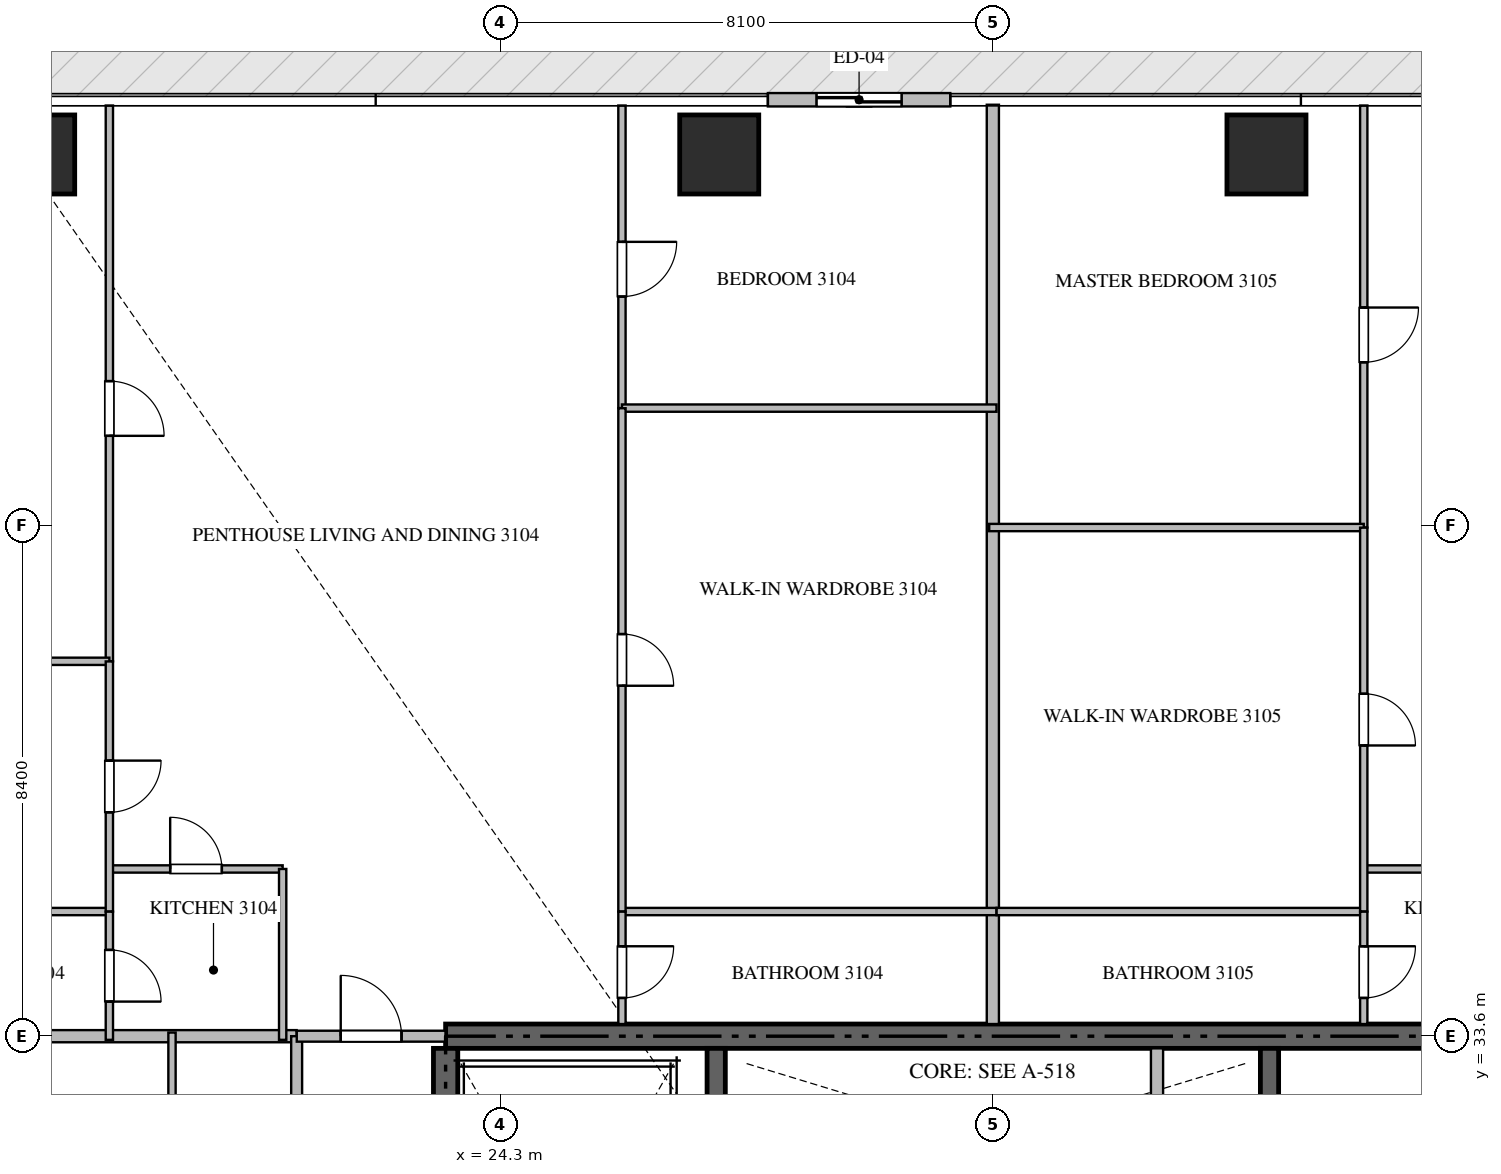
"""IFC4 building model, lengths in metres.
Left out: names, types, materials, properties, quantities, classifications, styles, units other than length and angle.
Written with IfcOpenShell. Run it as: python <this file> out.ifc"""

import sys

from ifc_helpers import new_model, si_unit, direction, frame, frame_2d, origin, origin_2d, place, context, subcontext, project, spatial, rectangle, extrude, source, transform, mapped, element, fill, save


model = new_model("IFC4")
c1 = context("Model", 3, precision=1e-05, world=origin(), true_north=direction((0.0, 1.0)))
c2 = subcontext(c1, "Body", "Model", "MODEL_VIEW")
j1 = project(units=[si_unit("LENGTHUNIT", "METRE"), si_unit("PLANEANGLEUNIT", "RADIAN")], contexts=[c1])
p1 = place(None, origin())
s1 = spatial("IfcSite", under=j1, at=p1, CompositionType="ELEMENT")
p2 = place(p1, origin())
s2 = spatial("IfcBuilding", under=s1, at=p2, CompositionType="ELEMENT")
p3 = place(p2, frame((0.0, 0.0, 127.65)))
s3 = spatial("IfcBuildingStorey", under=s2, at=p3, CompositionType="ELEMENT", Elevation=127.65)
p4 = place(p3, frame((41.4, 33.6, -0.26), z_axis=(0.0, 0.0, 1.0), x_axis=(-1.0, 0.0, 0.0)))
e1 = element("IfcWall", 1, at=p4, inside=s3, PredefinedType="SHEAR", context=c2, shape_type="SweptSolid", body=[
    extrude(rectangle(XDim=18.0, YDim=0.4, at=frame_2d((9.0, 0.0))), origin(), (0.0, 0.0, 1.0), 3.748),
])
p5 = place(p3, frame((23.4, 24.25, -0.26), z_axis=(0.0, 0.0, 1.0), x_axis=(0.0, 1.0, 0.0)))
e2 = element("IfcWall", 2, at=p5, inside=s3, PredefinedType="SHEAR", context=c2, shape_type="SweptSolid", body=[
    extrude(rectangle(XDim=9.15, YDim=0.4, at=frame_2d((4.575, 0.0))), origin(), (0.0, 0.0, 1.0), 3.748),
])
p6 = place(p3, frame((27.85, 23.55, -0.26), z_axis=(0.0, 0.0, 1.0), x_axis=(0.0, 1.0, 0.0)))
e3 = element("IfcWall", 3, at=p6, inside=s3, PredefinedType="SHEAR", context=c2, shape_type="SweptSolid", body=[
    extrude(rectangle(XDim=9.85, YDim=0.3, at=frame_2d((4.925, 0.0))), origin(), (0.0, 0.0, 1.0), 3.748),
])
p7 = place(p3, frame((36.95, 27.05, -0.26), z_axis=(0.0, 0.0, 1.0), x_axis=(0.0, 1.0, 0.0)))
e4 = element("IfcWall", 4, at=p7, inside=s3, PredefinedType="SHEAR", context=c2, shape_type="SweptSolid", body=[
    extrude(rectangle(XDim=6.35, YDim=0.3, at=frame_2d((3.175, 0.0))), origin(), (0.0, 0.0, 1.0), 3.748),
])
m1 = source(origin(), c2, "Body", "SweptSolid", [
    extrude(rectangle(XDim=1.3, YDim=1.3, at=origin_2d()), origin(), (0.0, 0.0, 1.0), 3.75),
])
for number, where, z_axis, x_axis in (
    (5, (16.65, 48.1, -0.26), (0.0, 0.0, 1.0), (1.0, 0.0, 0.0)),
    (6, (27.9, 48.1, -0.26), (0.0, 0.0, 1.0), (1.0, 0.0, 0.0)),
    (7, (36.9, 48.1, -0.26), (0.0, 0.0, 1.0), (1.0, 0.0, 0.0)),
):
    element("IfcColumn", number, at=place(p3, frame(where, z_axis=z_axis, x_axis=x_axis)), inside=s3, PredefinedType="COLUMN", context=c2, shape_type="MappedRepresentation", body=[
        mapped(m1, transform((0.0, 0.0, 0.0), scale=1.0)),
    ])
p8 = place(p3, frame((31.7, 49.0, 0.0), z_axis=(0.0, 0.0, 1.0), x_axis=(-1.0, 0.0, 0.0)))
e8 = element("IfcWall", 8, at=p8, inside=s3, PredefinedType="ELEMENTEDWALL", context=c2, shape_type="SweptSolid", body=[
    extrude(rectangle(XDim=3.0, YDim=0.22, at=frame_2d((1.5, 0.0))), origin(), (0.0, 0.0, 1.0), 3.475),
])
p9 = place(p8, frame((0.8, 0.0, 0.0)))
e9 = element("IfcOpeningElement", 9, at=p9, cuts=e8, PredefinedType="OPENING", context=c2, shape_type="SweptSolid", body=[
    extrude(rectangle(XDim=1.4, YDim=2.25, at=frame_2d((0.7, 1.125))), frame((0.0, 0.12, 0.0), z_axis=(0.0, -1.0, 0.0), x_axis=(1.0, 0.0, 0.0)), (0.0, 0.0, 1.0), 0.24),
])
p10 = place(p3, frame((35.1, 30.75, 0.0), z_axis=(0.0, 0.0, 1.0), x_axis=(0.0, 1.0, 0.0)))
e10 = element("IfcWall", 10, at=p10, inside=s3, PredefinedType="STANDARD", context=c2, shape_type="SweptSolid", body=[
    extrude(rectangle(XDim=2.65, YDim=0.2, at=frame_2d((1.325, 0.0))), origin(), (0.0, 0.0, 1.0), 3.49),
])
p11 = place(p3, frame((32.4, 33.8, 0.0), z_axis=(0.0, 0.0, 1.0), x_axis=(0.0, 1.0, 0.0)))
e11 = element("IfcWall", 11, at=p11, inside=s3, PredefinedType="PARTITIONING", context=c2, shape_type="SweptSolid", body=[
    extrude(rectangle(XDim=15.118, YDim=0.2, at=frame_2d((7.559, 0.0))), origin(), (0.0, 0.0, 1.0), 3.49),
])
p12 = place(p3, frame((7.882, 33.6, 0.0), z_axis=(0.0, 0.0, 1.0), x_axis=(1.0, 0.0, 0.0)))
e12 = element("IfcWall", 12, at=p12, inside=s3, PredefinedType="PARTITIONING", context=c2, shape_type="SweptSolid", body=[
    extrude(rectangle(XDim=13.068, YDim=0.2, at=frame_2d((6.534, 0.0))), origin(), (0.0, 0.0, 1.0), 3.49),
])
p13 = place(p3, frame((20.95, 14.9, 0.0), z_axis=(0.0, 0.0, 1.0), x_axis=(0.0, 1.0, 0.0)))
e13 = element("IfcWall", 13, at=p13, inside=s3, PredefinedType="PARTITIONING", context=c2, shape_type="SweptSolid", body=[
    extrude(rectangle(XDim=18.7, YDim=0.18, at=frame_2d((9.35, 0.0))), origin(), (0.0, 0.0, 1.0), 3.49),
])
p14 = place(p13, frame((1.805, 0.0, 0.0)))
e14 = element("IfcOpeningElement", 14, at=p14, cuts=e13, PredefinedType="OPENING", context=c2, shape_type="SweptSolid", body=[
    extrude(rectangle(XDim=1.0, YDim=2.15, at=frame_2d((0.5, 1.075))), frame((0.0, 0.1, 0.0), z_axis=(0.0, -1.0, 0.0), x_axis=(1.0, 0.0, 0.0)), (0.0, 0.0, 1.0), 0.2),
])
p15 = place(p13, frame((10.602, 0.0, 0.0)))
e15 = element("IfcOpeningElement", 15, at=p15, cuts=e13, PredefinedType="OPENING", context=c2, shape_type="SweptSolid", body=[
    extrude(rectangle(XDim=1.0, YDim=2.15, at=frame_2d((0.5, 1.075))), frame((0.0, 0.1, 0.0), z_axis=(0.0, -1.0, 0.0), x_axis=(1.0, 0.0, 0.0)), (0.0, 0.0, 1.0), 0.2),
])
p16 = place(p3, frame((20.952, 33.6, 0.0), z_axis=(0.0, 0.0, 1.0), x_axis=(1.0, 0.0, 0.0)))
e16 = element("IfcWall", 16, at=p16, inside=s3, PredefinedType="PARTITIONING", context=c2, shape_type="SweptSolid", body=[
    extrude(rectangle(XDim=2.446, YDim=0.18, at=frame_2d((1.223, 0.0))), origin(), (0.0, 0.0, 1.0), 3.49),
])
p17 = place(p16, frame((0.723, 0.0, 0.0)))
e17 = element("IfcOpeningElement", 17, at=p17, cuts=e16, PredefinedType="OPENING", context=c2, shape_type="SweptSolid", body=[
    extrude(rectangle(XDim=1.0, YDim=2.15, at=frame_2d((0.5, 1.075))), frame((0.0, 0.1, 0.0), z_axis=(0.0, -1.0, 0.0), x_axis=(1.0, 0.0, 0.0)), (0.0, 0.0, 1.0), 0.2),
])
p18 = place(p3, frame((17.87, 36.35, 0.0), z_axis=(0.0, 0.0, 1.0), x_axis=(1.0, 0.0, 0.0)))
e18 = element("IfcWall", 18, at=p18, inside=s3, PredefinedType="PARTITIONING", context=c2, shape_type="SweptSolid", body=[
    extrude(rectangle(XDim=2.85, YDim=0.12, at=frame_2d((1.425, 0.0))), origin(), (0.0, 0.0, 1.0), 3.49),
])
p19 = place(p18, frame((1.0, 0.0, 0.0)))
e19 = element("IfcOpeningElement", 19, at=p19, cuts=e18, PredefinedType="OPENING", context=c2, shape_type="SweptSolid", body=[
    extrude(rectangle(XDim=0.85, YDim=2.1, at=frame_2d((0.425, 1.05))), frame((0.0, 0.07, 0.0), z_axis=(0.0, -1.0, 0.0), x_axis=(1.0, 0.0, 0.0)), (0.0, 0.0, 1.0), 0.14),
])
p20 = place(p3, frame((20.72, 36.35, 0.0), z_axis=(0.0, 0.0, 1.0), x_axis=(0.0, -1.0, 0.0)))
e20 = element("IfcWall", 20, at=p20, inside=s3, PredefinedType="PARTITIONING", context=c2, shape_type="SweptSolid", body=[
    extrude(rectangle(XDim=2.81, YDim=0.12, at=frame_2d((1.405, 0.0))), origin(), (0.0, 0.0, 1.0), 3.49),
])
p21 = place(p3, frame((17.87, 48.905, 0.0), z_axis=(0.0, 0.0, 1.0), x_axis=(0.0, -1.0, 0.0)))
e21 = element("IfcWall", 21, at=p21, inside=s3, PredefinedType="PARTITIONING", context=c2, shape_type="SweptSolid", body=[
    extrude(rectangle(XDim=9.14, YDim=0.12, at=frame_2d((4.57, 0.0))), origin(), (0.0, 0.0, 1.0), 3.49),
])
p22 = place(p21, frame((4.532, 0.0, 0.0)))
e22 = element("IfcOpeningElement", 22, at=p22, cuts=e21, PredefinedType="OPENING", context=c2, shape_type="SweptSolid", body=[
    extrude(rectangle(XDim=0.9, YDim=2.1, at=frame_2d((0.45, 1.05))), frame((0.0, 0.07, 0.0), z_axis=(0.0, -1.0, 0.0), x_axis=(1.0, 0.0, 0.0)), (0.0, 0.0, 1.0), 0.14),
])
p23 = place(p3, frame((7.895, 39.765, 0.0), z_axis=(0.0, 0.0, 1.0), x_axis=(1.0, 0.0, 0.0)))
e23 = element("IfcWall", 23, at=p23, inside=s3, PredefinedType="PARTITIONING", context=c2, shape_type="SweptSolid", body=[
    extrude(rectangle(XDim=9.975, YDim=0.12, at=frame_2d((4.988, 0.0))), origin(), (0.0, 0.0, 1.0), 3.49),
])
p24 = place(p3, frame((14.67, 35.65, 0.0), z_axis=(0.0, 0.0, 1.0), x_axis=(1.0, 0.0, 0.0)))
e24 = element("IfcWall", 24, at=p24, inside=s3, PredefinedType="PARTITIONING", context=c2, shape_type="SweptSolid", body=[
    extrude(rectangle(XDim=3.2, YDim=0.12, at=frame_2d((1.6, 0.0))), origin(), (0.0, 0.0, 1.0), 3.49),
])
p25 = place(p3, frame((17.87, 39.763, 0.0), z_axis=(0.0, 0.0, 1.0), x_axis=(0.0, -1.0, 0.0)))
e25 = element("IfcWall", 25, at=p25, inside=s3, PredefinedType="PARTITIONING", context=c2, shape_type="SweptSolid", body=[
    extrude(rectangle(XDim=4.113, YDim=0.12, at=frame_2d((2.057, 0.0))), origin(), (0.0, 0.0, 1.0), 3.49),
])
p26 = place(p25, frame((1.631, 0.0, 0.0)))
e26 = element("IfcOpeningElement", 26, at=p26, cuts=e25, PredefinedType="OPENING", context=c2, shape_type="SweptSolid", body=[
    extrude(rectangle(XDim=0.85, YDim=2.1, at=frame_2d((0.425, 1.05))), frame((0.0, 0.07, 0.0), z_axis=(0.0, -1.0, 0.0), x_axis=(1.0, 0.0, 0.0)), (0.0, 0.0, 1.0), 0.14),
])
p27 = place(p3, frame((17.87, 35.648, 0.0), z_axis=(0.0, 0.0, 1.0), x_axis=(0.0, -1.0, 0.0)))
e27 = element("IfcWall", 27, at=p27, inside=s3, PredefinedType="PARTITIONING", context=c2, shape_type="SweptSolid", body=[
    extrude(rectangle(XDim=2.108, YDim=0.12, at=frame_2d((1.054, 0.0))), origin(), (0.0, 0.0, 1.0), 3.49),
])
p28 = place(p27, frame((0.629, 0.0, 0.0)))
e28 = element("IfcOpeningElement", 28, at=p28, cuts=e27, PredefinedType="OPENING", context=c2, shape_type="SweptSolid", body=[
    extrude(rectangle(XDim=0.85, YDim=2.1, at=frame_2d((0.425, 1.05))), frame((0.0, 0.07, 0.0), z_axis=(0.0, -1.0, 0.0), x_axis=(1.0, 0.0, 0.0)), (0.0, 0.0, 1.0), 0.14),
])
p29 = place(p3, frame((26.3, 48.905, 0.0), z_axis=(0.0, 0.0, 1.0), x_axis=(0.0, -1.0, 0.0)))
e29 = element("IfcWall", 29, at=p29, inside=s3, PredefinedType="PARTITIONING", context=c2, shape_type="SweptSolid", body=[
    extrude(rectangle(XDim=4.976, YDim=0.12, at=frame_2d((2.488, 0.0))), origin(), (0.0, 0.0, 1.0), 3.49),
])
p30 = place(p29, frame((2.242, 0.0, 0.0)))
e30 = element("IfcOpeningElement", 30, at=p30, cuts=e29, PredefinedType="OPENING", context=c2, shape_type="SweptSolid", body=[
    extrude(rectangle(XDim=0.9, YDim=2.1, at=frame_2d((0.45, 1.05))), frame((0.0, 0.07, 0.0), z_axis=(0.0, -1.0, 0.0), x_axis=(1.0, 0.0, 0.0)), (0.0, 0.0, 1.0), 0.14),
])
for number, where, z_axis, x_axis in (
    (31, (26.3, 43.929, 0.0), (0.0, 0.0, 1.0), (1.0, 0.0, 0.0)),
    (32, (26.3, 35.65, 0.0), (0.0, 0.0, 1.0), (1.0, 0.0, 0.0)),
):
    element("IfcWall", number, at=place(p3, frame(where, z_axis=z_axis, x_axis=x_axis)), inside=s3, PredefinedType="PARTITIONING", context=c2, shape_type="SweptSolid", body=[
        extrude(rectangle(XDim=6.16, YDim=0.12, at=frame_2d((3.08, 0.0))), origin(), (0.0, 0.0, 1.0), 3.49),
    ])
p31 = place(p3, frame((26.3, 43.927, 0.0), z_axis=(0.0, 0.0, 1.0), x_axis=(0.0, -1.0, 0.0)))
e33 = element("IfcWall", 33, at=p31, inside=s3, PredefinedType="PARTITIONING", context=c2, shape_type="SweptSolid", body=[
    extrude(rectangle(XDim=8.277, YDim=0.12, at=frame_2d((4.139, 0.0))), origin(), (0.0, 0.0, 1.0), 3.49),
])
p32 = place(p31, frame((3.714, 0.0, 0.0)))
e34 = element("IfcOpeningElement", 34, at=p32, cuts=e33, PredefinedType="OPENING", context=c2, shape_type="SweptSolid", body=[
    extrude(rectangle(XDim=0.85, YDim=2.1, at=frame_2d((0.425, 1.05))), frame((0.0, 0.07, 0.0), z_axis=(0.0, -1.0, 0.0), x_axis=(1.0, 0.0, 0.0)), (0.0, 0.0, 1.0), 0.14),
])
p33 = place(p3, frame((26.3, 35.648, 0.0), z_axis=(0.0, 0.0, 1.0), x_axis=(0.0, -1.0, 0.0)))
e35 = element("IfcWall", 35, at=p33, inside=s3, PredefinedType="PARTITIONING", context=c2, shape_type="SweptSolid", body=[
    extrude(rectangle(XDim=1.848, YDim=0.12, at=frame_2d((0.924, 0.0))), origin(), (0.0, 0.0, 1.0), 3.49),
])
p34 = place(p33, frame((0.569, 0.0, 0.0)))
e36 = element("IfcOpeningElement", 36, at=p34, cuts=e35, PredefinedType="OPENING", context=c2, shape_type="SweptSolid", body=[
    extrude(rectangle(XDim=0.85, YDim=2.1, at=frame_2d((0.425, 1.05))), frame((0.0, 0.07, 0.0), z_axis=(0.0, -1.0, 0.0), x_axis=(1.0, 0.0, 0.0)), (0.0, 0.0, 1.0), 0.14),
])
p35 = place(p3, frame((38.5, 36.35, 0.0), z_axis=(0.0, 0.0, 1.0), x_axis=(1.0, 0.0, 0.0)))
e37 = element("IfcWall", 37, at=p35, inside=s3, PredefinedType="PARTITIONING", context=c2, shape_type="SweptSolid", body=[
    extrude(rectangle(XDim=2.85, YDim=0.12, at=frame_2d((1.425, 0.0))), origin(), (0.0, 0.0, 1.0), 3.49),
])
p36 = place(p35, frame((1.0, 0.0, 0.0)))
e38 = element("IfcOpeningElement", 38, at=p36, cuts=e37, PredefinedType="OPENING", context=c2, shape_type="SweptSolid", body=[
    extrude(rectangle(XDim=0.85, YDim=2.1, at=frame_2d((0.425, 1.05))), frame((0.0, 0.07, 0.0), z_axis=(0.0, -1.0, 0.0), x_axis=(1.0, 0.0, 0.0)), (0.0, 0.0, 1.0), 0.14),
])
p37 = place(p3, frame((38.5, 48.905, 0.0), z_axis=(0.0, 0.0, 1.0), x_axis=(0.0, -1.0, 0.0)))
e39 = element("IfcWall", 39, at=p37, inside=s3, PredefinedType="PARTITIONING", context=c2, shape_type="SweptSolid", body=[
    extrude(rectangle(XDim=6.94, YDim=0.12, at=frame_2d((3.47, 0.0))), origin(), (0.0, 0.0, 1.0), 3.49),
])
p38 = place(p37, frame((3.322, 0.0, 0.0)))
e40 = element("IfcOpeningElement", 40, at=p38, cuts=e39, PredefinedType="OPENING", context=c2, shape_type="SweptSolid", body=[
    extrude(rectangle(XDim=0.9, YDim=2.1, at=frame_2d((0.45, 1.05))), frame((0.0, 0.07, 0.0), z_axis=(0.0, -1.0, 0.0), x_axis=(1.0, 0.0, 0.0)), (0.0, 0.0, 1.0), 0.14),
])
p39 = place(p3, frame((32.34, 41.965, 0.0), z_axis=(0.0, 0.0, 1.0), x_axis=(1.0, 0.0, 0.0)))
e41 = element("IfcWall", 41, at=p39, inside=s3, PredefinedType="PARTITIONING", context=c2, shape_type="SweptSolid", body=[
    extrude(rectangle(XDim=6.16, YDim=0.12, at=frame_2d((3.08, 0.0))), origin(), (0.0, 0.0, 1.0), 3.49),
])
p40 = place(p3, frame((32.462, 35.65, 0.0), z_axis=(0.0, 0.0, 1.0), x_axis=(1.0, 0.0, 0.0)))
e42 = element("IfcWall", 42, at=p40, inside=s3, PredefinedType="PARTITIONING", context=c2, shape_type="SweptSolid", body=[
    extrude(rectangle(XDim=6.038, YDim=0.12, at=frame_2d((3.019, 0.0))), origin(), (0.0, 0.0, 1.0), 3.49),
])
p41 = place(p3, frame((38.5, 41.963, 0.0), z_axis=(0.0, 0.0, 1.0), x_axis=(0.0, -1.0, 0.0)))
e43 = element("IfcWall", 43, at=p41, inside=s3, PredefinedType="PARTITIONING", context=c2, shape_type="SweptSolid", body=[
    extrude(rectangle(XDim=6.313, YDim=0.12, at=frame_2d((3.156, 0.0))), origin(), (0.0, 0.0, 1.0), 3.49),
])
p42 = place(p41, frame((2.732, 0.0, 0.0)))
e44 = element("IfcOpeningElement", 44, at=p42, cuts=e43, PredefinedType="OPENING", context=c2, shape_type="SweptSolid", body=[
    extrude(rectangle(XDim=0.85, YDim=2.1, at=frame_2d((0.425, 1.05))), frame((0.0, 0.07, 0.0), z_axis=(0.0, -1.0, 0.0), x_axis=(1.0, 0.0, 0.0)), (0.0, 0.0, 1.0), 0.14),
])
p43 = place(p3, frame((38.5, 35.648, 0.0), z_axis=(0.0, 0.0, 1.0), x_axis=(0.0, -1.0, 0.0)))
e45 = element("IfcWall", 45, at=p43, inside=s3, PredefinedType="PARTITIONING", context=c2, shape_type="SweptSolid", body=[
    extrude(rectangle(XDim=1.848, YDim=0.12, at=frame_2d((0.924, 0.0))), origin(), (0.0, 0.0, 1.0), 3.49),
])
p44 = place(p43, frame((0.569, 0.0, 0.0)))
e46 = element("IfcOpeningElement", 46, at=p44, cuts=e45, PredefinedType="OPENING", context=c2, shape_type="SweptSolid", body=[
    extrude(rectangle(XDim=0.85, YDim=2.1, at=frame_2d((0.425, 1.05))), frame((0.0, 0.07, 0.0), z_axis=(0.0, -1.0, 0.0), x_axis=(1.0, 0.0, 0.0)), (0.0, 0.0, 1.0), 0.14),
])
p45 = place(p3, frame((18.9, 27.8, 0.0), z_axis=(0.0, 0.0, 1.0), x_axis=(0.0, 1.0, 0.0)))
e47 = element("IfcWall", 47, at=p45, inside=s3, PredefinedType="PARTITIONING", context=c2, shape_type="SweptSolid", body=[
    extrude(rectangle(XDim=5.86, YDim=0.12, at=frame_2d((2.93, 0.0))), origin(), (0.0, 0.0, 1.0), 3.49),
])
m2 = source(origin(), c2, "Body", "SweptSolid", [
    extrude(rectangle(XDim=1.4, YDim=2.25, at=frame_2d((0.7, 1.125))), frame((0.0, 0.025, 0.0), z_axis=(0.0, -1.0, 0.0), x_axis=(1.0, 0.0, 0.0)), (0.0, 0.0, 1.0), 0.05),
])
p46 = place(p9, origin())
e48 = element("IfcDoor", 48, at=p46, inside=s3, OperationType="SLIDING_TO_LEFT", PredefinedType="DOOR", context=c2, shape_type="MappedRepresentation", body=[
    mapped(m2, transform((0.0, 0.0, 0.0), scale=1.0)),
])
fill(e9, e48)
m3 = source(origin(), c2, "Body", "SweptSolid", [
    extrude(rectangle(XDim=1.0, YDim=2.15, at=frame_2d((0.5, 1.075))), frame((0.0, 0.025, 0.0), z_axis=(0.0, -1.0, 0.0), x_axis=(1.0, 0.0, 0.0)), (0.0, 0.0, 1.0), 0.05),
])
p47 = place(p17, origin())
e49 = element("IfcDoor", 49, at=p47, inside=s3, OperationType="SINGLE_SWING_LEFT", PredefinedType="DOOR", context=c2, shape_type="MappedRepresentation", body=[
    mapped(m3, transform((0.0, 0.0, 0.0), scale=1.0)),
])
fill(e17, e49)
m4 = source(origin(), c2, "Body", "SweptSolid", [
    extrude(rectangle(XDim=0.85, YDim=2.1, at=frame_2d((0.425, 1.05))), frame((0.0, 0.025, 0.0), z_axis=(0.0, -1.0, 0.0), x_axis=(1.0, 0.0, 0.0)), (0.0, 0.0, 1.0), 0.05),
])
p48 = place(p19, origin())
e50 = element("IfcDoor", 50, at=p48, inside=s3, OperationType="SINGLE_SWING_LEFT", PredefinedType="DOOR", context=c2, shape_type="MappedRepresentation", body=[
    mapped(m4, transform((0.0, 0.0, 0.0), scale=1.0)),
])
fill(e19, e50)
m5 = source(origin(), c2, "Body", "SweptSolid", [
    extrude(rectangle(XDim=0.9, YDim=2.1, at=frame_2d((0.45, 1.05))), frame((0.0, 0.025, 0.0), z_axis=(0.0, -1.0, 0.0), x_axis=(1.0, 0.0, 0.0)), (0.0, 0.0, 1.0), 0.05),
])
p49 = place(p22, origin())
e51 = element("IfcDoor", 51, at=p49, inside=s3, OperationType="SINGLE_SWING_RIGHT", PredefinedType="DOOR", context=c2, shape_type="MappedRepresentation", body=[
    mapped(m5, transform((0.0, 0.0, 0.0), scale=1.0)),
])
fill(e22, e51)
p50 = place(p26, origin())
e52 = element("IfcDoor", 52, at=p50, inside=s3, OperationType="SINGLE_SWING_LEFT", PredefinedType="DOOR", context=c2, shape_type="MappedRepresentation", body=[
    mapped(m4, transform((0.0, 0.0, 0.0), scale=1.0)),
])
fill(e26, e52)
p51 = place(p28, origin())
e53 = element("IfcDoor", 53, at=p51, inside=s3, OperationType="SINGLE_SWING_RIGHT", PredefinedType="DOOR", context=c2, shape_type="MappedRepresentation", body=[
    mapped(m4, transform((0.0, 0.0, 0.0), scale=1.0)),
])
fill(e28, e53)
p52 = place(p30, origin())
e54 = element("IfcDoor", 54, at=p52, inside=s3, OperationType="SINGLE_SWING_LEFT", PredefinedType="DOOR", context=c2, shape_type="MappedRepresentation", body=[
    mapped(m5, transform((0.0, 0.0, 0.0), scale=1.0)),
])
fill(e30, e54)
p53 = place(p32, origin())
e55 = element("IfcDoor", 55, at=p53, inside=s3, OperationType="SINGLE_SWING_RIGHT", PredefinedType="DOOR", context=c2, shape_type="MappedRepresentation", body=[
    mapped(m4, transform((0.0, 0.0, 0.0), scale=1.0)),
])
fill(e34, e55)
p54 = place(p34, origin())
e56 = element("IfcDoor", 56, at=p54, inside=s3, OperationType="SINGLE_SWING_LEFT", PredefinedType="DOOR", context=c2, shape_type="MappedRepresentation", body=[
    mapped(m4, transform((0.0, 0.0, 0.0), scale=1.0)),
])
fill(e36, e56)
p55 = place(p38, origin())
e57 = element("IfcDoor", 57, at=p55, inside=s3, OperationType="SINGLE_SWING_LEFT", PredefinedType="DOOR", context=c2, shape_type="MappedRepresentation", body=[
    mapped(m5, transform((0.0, 0.0, 0.0), scale=1.0)),
])
fill(e40, e57)
p56 = place(p42, origin())
e58 = element("IfcDoor", 58, at=p56, inside=s3, OperationType="SINGLE_SWING_RIGHT", PredefinedType="DOOR", context=c2, shape_type="MappedRepresentation", body=[
    mapped(m4, transform((0.0, 0.0, 0.0), scale=1.0)),
])
fill(e44, e58)
p57 = place(p44, origin())
e59 = element("IfcDoor", 59, at=p57, inside=s3, OperationType="SINGLE_SWING_LEFT", PredefinedType="DOOR", context=c2, shape_type="MappedRepresentation", body=[
    mapped(m4, transform((0.0, 0.0, 0.0), scale=1.0)),
])
fill(e46, e59)
save(model, sys.argv[1])
